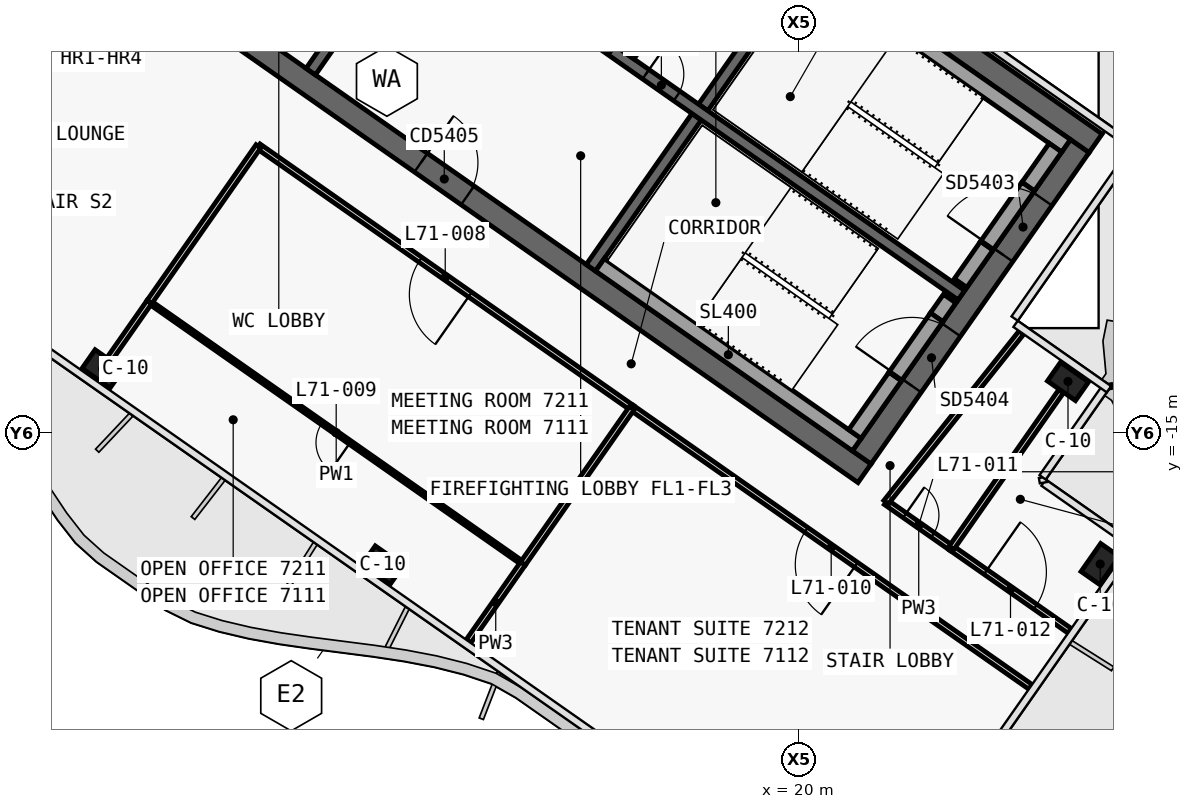
"""IFC4 building model, lengths in metres.
Left out: names, types, materials, properties, quantities, classifications, styles, units other than length and angle.
Written with IfcOpenShell. Run it as: python <this file> out.ifc"""

import sys

from ifc_helpers import new_model, si_unit, direction, frame, frame_2d, origin, origin_2d, place, context, subcontext, project, spatial, polyline, rectangle, outline, extrude, element, fill, save


model = new_model("IFC4")
c1 = context("Model", 3, precision=1e-05, world=origin(), true_north=direction((0.0, 1.0)))
c2 = subcontext(c1, "Body", "Model", "MODEL_VIEW")
j1 = project(units=[si_unit("LENGTHUNIT", "METRE"), si_unit("PLANEANGLEUNIT", "RADIAN")], contexts=[c1])
p1 = place(None, origin())
s1 = spatial("IfcSite", under=j1, at=p1, CompositionType="ELEMENT")
p2 = place(p1, origin())
s2 = spatial("IfcBuilding", under=s1, at=p2, CompositionType="ELEMENT")
p3 = place(p2, frame((0.0, 0.0, 299.5)))
s3 = spatial("IfcBuildingStorey", under=s2, at=p3, CompositionType="ELEMENT", Elevation=299.5)
p4 = place(p3, frame((0.028, 12.066, 0.0), z_axis=(0.0, 0.0, 1.0), x_axis=(0.819151382952, -0.573577380837, 0.0)))
e1 = element("IfcWall", 1, at=p4, inside=s3, PredefinedType="SHEAR", context=c2, shape_type="SweptSolid", body=[
    extrude(outline(polyline([(33.898, 0.3), (0.0, 0.3), (0.42, -0.3), (33.898, -0.3), (33.898, 0.3)])), origin(), (0.0, 0.0, 1.0), 3.9),
])
p5 = place(p3, frame((0.028, -0.874, 0.0), z_axis=(0.0, 0.0, 1.0), x_axis=(0.819150035022, -0.573579305871, 0.0)))
e2 = element("IfcWall", 2, at=p5, inside=s3, PredefinedType="SHEAR", context=c2, shape_type="SweptSolid", body=[
    extrude(outline(polyline([(26.476, 0.3), (0.0, 0.3), (0.42, -0.3), (26.476, -0.3), (26.476, 0.3)])), origin(), (0.0, 0.0, 1.0), 3.9),
])
p6 = place(p5, frame((1.026, 0.0, 0.0)))
e3 = element("IfcOpeningElement", 3, at=p6, cuts=e2, PredefinedType="OPENING", context=c2, shape_type="SweptSolid", body=[
    extrude(rectangle(XDim=1.5, YDim=2.1, at=frame_2d((0.75, 1.05))), frame((0.0, 0.31, 0.0), z_axis=(0.0, -1.0, 0.0), x_axis=(1.0, 0.0, 0.0)), (0.0, 0.0, 1.0), 0.62),
])
p7 = place(p5, frame((12.226, 0.0, 0.0)))
e4 = element("IfcOpeningElement", 4, at=p7, cuts=e2, PredefinedType="OPENING", context=c2, shape_type="SweptSolid", body=[
    extrude(rectangle(XDim=1.5, YDim=2.1, at=frame_2d((0.75, 1.05))), frame((0.0, 0.31, 0.0), z_axis=(0.0, -1.0, 0.0), x_axis=(1.0, 0.0, 0.0)), (0.0, 0.0, 1.0), 0.62),
])
p8 = place(p3, frame((21.642, -15.642, 0.0), z_axis=(0.0, 0.0, 1.0), x_axis=(0.573586866468, 0.819144740944, 0.0)))
e5 = element("IfcWall", 5, at=p8, inside=s3, PredefinedType="SHEAR", context=c2, shape_type="SweptSolid", body=[
    extrude(outline(polyline([(10.0, 0.3), (0.0, 0.3), (0.0, -0.3), (10.0, -0.3), (10.0, 0.3)])), origin(), (0.0, 0.0, 1.0), 3.9),
])
p9 = place(p8, frame((6.5, 0.0, 0.0)))
e6 = element("IfcOpeningElement", 6, at=p9, cuts=e5, PredefinedType="OPENING", context=c2, shape_type="SweptSolid", body=[
    extrude(rectangle(XDim=1.8, YDim=2.1, at=frame_2d((0.9, 1.05))), frame((0.0, 0.31, 0.0), z_axis=(0.0, -1.0, 0.0), x_axis=(1.0, 0.0, 0.0)), (0.0, 0.0, 1.0), 0.62),
])
p10 = place(p8, frame((2.3, 0.0, 0.0)))
e7 = element("IfcOpeningElement", 7, at=p10, cuts=e5, PredefinedType="OPENING", context=c2, shape_type="SweptSolid", body=[
    extrude(rectangle(XDim=1.8, YDim=2.1, at=frame_2d((0.9, 1.05))), frame((0.0, 0.31, 0.0), z_axis=(0.0, -1.0, 0.0), x_axis=(1.0, 0.0, 0.0)), (0.0, 0.0, 1.0), 0.62),
])
p11 = place(p3, frame((7.143, -5.49, 0.0), z_axis=(0.0, 0.0, 1.0), x_axis=(0.573617744349, 0.819123118565, 0.0)))
e8 = element("IfcWall", 8, at=p11, inside=s3, PredefinedType="SHEAR", context=c2, shape_type="SweptSolid", body=[
    extrude(outline(polyline([(0.0, 0.15), (0.0, -0.15), (4.85, -0.15), (4.85, 0.15), (0.0, 0.15)])), origin(), (0.0, 0.0, 1.0), 3.9),
])
p12 = place(p3, frame((14.515, -10.652, 0.0), z_axis=(0.0, 0.0, 1.0), x_axis=(0.573560315113, 0.819163332265, 0.0)))
e9 = element("IfcWall", 9, at=p12, inside=s3, PredefinedType="SHEAR", context=c2, shape_type="SweptSolid", body=[
    extrude(outline(polyline([(0.0, 0.15), (0.0, -0.15), (4.85, -0.15), (4.85, 0.15), (0.0, 0.15)])), origin(), (0.0, 0.0, 1.0), 3.9),
])
p13 = place(p3, frame((17.469, -6.433, 0.0), z_axis=(0.0, 0.0, 1.0), x_axis=(0.573594092424, 0.81913968109, 0.0)))
e10 = element("IfcWall", 10, at=p13, inside=s3, PredefinedType="SHEAR", context=c2, shape_type="SweptSolid", body=[
    extrude(outline(polyline([(4.85, -0.15), (4.85, 0.15), (0.0, 0.15), (0.0, -0.15), (4.85, -0.15)])), origin(), (0.0, 0.0, 1.0), 3.9),
])
p14 = place(p3, frame((2.638, 3.768, 0.0), z_axis=(0.0, 0.0, 1.0), x_axis=(0.819155014212, -0.573572194837, 0.0)))
e11 = element("IfcWall", 11, at=p14, inside=s3, PredefinedType="SHEAR", context=c2, shape_type="SweptSolid", body=[
    extrude(outline(polyline([(0.0, 0.15), (0.0, -0.15), (26.4, -0.15), (26.4, 0.15), (0.0, 0.15)])), origin(), (0.0, 0.0, 1.0), 3.9),
])
p15 = place(p14, frame((9.637, 0.0, 0.0)))
e12 = element("IfcOpeningElement", 12, at=p15, cuts=e11, PredefinedType="OPENING", context=c2, shape_type="SweptSolid", body=[
    extrude(rectangle(XDim=1.2, YDim=2.1, at=frame_2d((0.6, 1.05))), frame((0.0, 0.16, 0.0), z_axis=(0.0, -1.0, 0.0), x_axis=(1.0, 0.0, 0.0)), (0.0, 0.0, 1.0), 0.32),
])
p16 = place(p14, frame((11.812, 0.0, 0.0)))
e13 = element("IfcOpeningElement", 13, at=p16, cuts=e11, PredefinedType="OPENING", context=c2, shape_type="SweptSolid", body=[
    extrude(rectangle(XDim=1.2, YDim=2.1, at=frame_2d((0.6, 1.05))), frame((0.0, 0.16, 0.0), z_axis=(0.0, -1.0, 0.0), x_axis=(1.0, 0.0, 0.0)), (0.0, 0.0, 1.0), 0.32),
])
p17 = place(p14, frame((13.988, 0.0, 0.0)))
e14 = element("IfcOpeningElement", 14, at=p17, cuts=e11, PredefinedType="OPENING", context=c2, shape_type="SweptSolid", body=[
    extrude(rectangle(XDim=1.2, YDim=2.1, at=frame_2d((0.6, 1.05))), frame((0.0, 0.16, 0.0), z_axis=(0.0, -1.0, 0.0), x_axis=(1.0, 0.0, 0.0)), (0.0, 0.0, 1.0), 0.32),
])
p18 = place(p14, frame((16.262, 0.0, 0.0)))
e15 = element("IfcOpeningElement", 15, at=p18, cuts=e11, PredefinedType="OPENING", context=c2, shape_type="SweptSolid", body=[
    extrude(rectangle(XDim=1.0, YDim=2.1, at=frame_2d((0.5, 1.05))), frame((0.0, 0.16, 0.0), z_axis=(0.0, -1.0, 0.0), x_axis=(1.0, 0.0, 0.0)), (0.0, 0.0, 1.0), 0.32),
])
for number, where, z_axis, x_axis in (
    (16, (1.665, -13.313, 0.0), (0.0, 0.0, 1.0), (0.819, -0.574, 0.0)),
    (17, (9.038, -18.475, 0.0), (0.0, 0.0, 1.0), (0.819, -0.574, 0.0)),
    (18, (27.07, -13.644, 0.0), (0.0, 0.0, 1.0), (0.819, -0.574, 0.0)),
    (19, (27.917, -18.449, 0.0), (0.0, 0.0, 1.0), (0.574, 0.819, 0.0)),
):
    element("IfcColumn", number, at=place(p3, frame(where, z_axis=z_axis, x_axis=x_axis)), inside=s3, PredefinedType="COLUMN", context=c2, shape_type="SweptSolid", body=[
        extrude(rectangle(XDim=0.9, YDim=0.6, at=origin_2d()), origin(), (0.0, 0.0, 1.0), 3.9),
    ])
p19 = place(p3, frame((15.565, -5.1, 0.0), z_axis=(0.0, 0.0, 1.0), x_axis=(0.573560315113, 0.819163332265, 0.0)))
e20 = element("IfcWall", 20, at=p19, inside=s3, PredefinedType="SOLIDWALL", context=c2, shape_type="SweptSolid", body=[
    extrude(rectangle(XDim=4.85, YDim=0.2, at=frame_2d((2.425, 0.0))), origin(), (0.0, 0.0, 1.0), 3.9),
])
p20 = place(p3, frame((20.259, -2.71, 0.0), z_axis=(0.0, 0.0, 1.0), x_axis=(0.81914849389, -0.573581506813, 0.0)))
e21 = element("IfcWall", 21, at=p20, inside=s3, PredefinedType="SOLIDWALL", context=c2, shape_type="SweptSolid", body=[
    extrude(rectangle(XDim=8.25, YDim=0.4, at=frame_2d((4.125, 0.0))), origin(), (0.0, 0.0, 1.0), 3.62),
])
p21 = place(p3, frame((24.244, -11.055, 0.0), z_axis=(0.0, 0.0, 1.0), x_axis=(0.573571582932, 0.819155442668, 0.0)))
e22 = element("IfcWall", 22, at=p21, inside=s3, PredefinedType="SOLIDWALL", context=c2, shape_type="SweptSolid", body=[
    extrude(rectangle(XDim=1.2, YDim=0.4, at=frame_2d((0.6, 0.0))), origin(), (0.0, 0.0, 1.0), 3.62),
])
p22 = place(p3, frame((26.022, -8.515, 0.0), z_axis=(0.0, 0.0, 1.0), x_axis=(0.573619628835, 0.819121798889, 0.0)))
e23 = element("IfcWall", 23, at=p22, inside=s3, PredefinedType="SOLIDWALL", context=c2, shape_type="SweptSolid", body=[
    extrude(rectangle(XDim=1.25, YDim=0.4, at=frame_2d((0.625, 0.0))), origin(), (0.0, 0.0, 1.0), 3.62),
])
p23 = place(p3, frame((24.932, -10.072, 2.15), z_axis=(0.0, 0.0, 1.0), x_axis=(0.573591692345, 0.819141361715, 0.0)))
e24 = element("IfcWall", 24, at=p23, inside=s3, PredefinedType="SOLIDWALL", context=c2, shape_type="SweptSolid", body=[
    extrude(rectangle(XDim=1.9, YDim=0.4, at=frame_2d((0.95, 0.0))), origin(), (0.0, 0.0, 1.0), 1.47),
])
p24 = place(p3, frame((14.753, -10.574, 0.0), z_axis=(0.0, 0.0, 1.0), x_axis=(0.819158229677, -0.573567602601, 0.0)))
e25 = element("IfcWall", 25, at=p24, inside=s3, PredefinedType="SOLIDWALL", context=c2, shape_type="SweptSolid", body=[
    extrude(rectangle(XDim=8.25, YDim=0.4, at=frame_2d((4.125, 0.0))), origin(), (0.0, 0.0, 1.0), 3.62),
])
p25 = place(p3, frame((21.462, -15.028, 0.0), z_axis=(0.0, 0.0, 1.0), x_axis=(0.573559770908, 0.819163713305, 0.0)))
e26 = element("IfcWall", 26, at=p25, inside=s3, PredefinedType="SOLIDWALL", context=c2, shape_type="SweptSolid", body=[
    extrude(rectangle(XDim=1.85, YDim=0.4, at=frame_2d((0.925, 0.0))), origin(), (0.0, 0.0, 1.0), 3.62),
])
p26 = place(p3, frame((23.613, -11.956, 0.0), z_axis=(0.0, 0.0, 1.0), x_axis=(0.573435029941, 0.819251039936, 0.0)))
e27 = element("IfcWall", 27, at=p26, inside=s3, PredefinedType="SOLIDWALL", context=c2, shape_type="SweptSolid", body=[
    extrude(rectangle(XDim=0.6, YDim=0.4, at=frame_2d((0.3, 0.0))), origin(), (0.0, 0.0, 1.0), 3.62),
])
p27 = place(p3, frame((22.523, -13.512, 2.15), z_axis=(0.0, 0.0, 1.0), x_axis=(0.573591692345, 0.819141361715, 0.0)))
e28 = element("IfcWall", 28, at=p27, inside=s3, PredefinedType="SOLIDWALL", context=c2, shape_type="SweptSolid", body=[
    extrude(rectangle(XDim=1.9, YDim=0.4, at=frame_2d((0.95, 0.0))), origin(), (0.0, 0.0, 1.0), 1.47),
])
p28 = place(p3, frame((22.281, -16.822, 0.0), z_axis=(0.0, 0.0, 1.0), x_axis=(0.819166447083, -0.573555866479, 0.0)))
e29 = element("IfcWall", 29, at=p28, inside=s3, PredefinedType="PARTITIONING", context=c2, shape_type="SweptSolid", body=[
    extrude(rectangle(XDim=2.102, YDim=0.15, at=frame_2d((1.051, 0.0))), origin(), (0.0, 0.0, 1.0), 3.05),
])
p29 = place(p28, frame((0.601, 0.0, 0.0)))
e30 = element("IfcOpeningElement", 30, at=p29, cuts=e29, PredefinedType="OPENING", context=c2, shape_type="SweptSolid", body=[
    extrude(rectangle(XDim=0.9, YDim=2.1, at=frame_2d((0.45, 1.05))), frame((0.0, 0.085, 0.0), z_axis=(0.0, -1.0, 0.0), x_axis=(1.0, 0.0, 0.0)), (0.0, 0.0, 1.0), 0.17),
])
p30 = place(p3, frame((23.999, -18.025, 0.0), z_axis=(0.0, 0.0, 1.0), x_axis=(0.819168564183, -0.573552842775, 0.0)))
e31 = element("IfcWall", 31, at=p30, inside=s3, PredefinedType="PARTITIONING", context=c2, shape_type="SweptSolid", body=[
    extrude(rectangle(XDim=3.802, YDim=0.15, at=frame_2d((1.901, 0.0))), origin(), (0.0, 0.0, 1.0), 3.0),
])
p31 = place(p30, frame((1.101, 0.0, 0.0)))
e32 = element("IfcOpeningElement", 32, at=p31, cuts=e31, PredefinedType="OPENING", context=c2, shape_type="SweptSolid", body=[
    extrude(rectangle(XDim=1.6, YDim=2.1, at=frame_2d((0.8, 1.05))), frame((0.0, 0.085, 0.0), z_axis=(0.0, -1.0, 0.0), x_axis=(1.0, 0.0, 0.0)), (0.0, 0.0, 1.0), 0.17),
])
p32 = place(p3, frame((15.598, -14.34, 0.0), z_axis=(0.0, 0.0, 1.0), x_axis=(-0.81915546166, 0.573571555809, 0.0)))
e33 = element("IfcWall", 33, at=p32, inside=s3, PredefinedType="PARTITIONING", context=c2, shape_type="SweptSolid", body=[
    extrude(rectangle(XDim=12.002, YDim=0.15, at=frame_2d((6.001, 0.0))), origin(), (0.0, 0.0, 1.0), 3.05),
])
p33 = place(p32, frame((5.201, 0.0, 0.0)))
e34 = element("IfcOpeningElement", 34, at=p33, cuts=e33, PredefinedType="OPENING", context=c2, shape_type="SweptSolid", body=[
    extrude(rectangle(XDim=1.6, YDim=2.1, at=frame_2d((0.8, 1.05))), frame((0.0, 0.085, 0.0), z_axis=(0.0, -1.0, 0.0), x_axis=(1.0, 0.0, 0.0)), (0.0, 0.0, 1.0), 0.17),
])
p34 = place(p3, frame((26.081, -21.68, 0.0), z_axis=(0.0, 0.0, 1.0), x_axis=(-0.819158447199, 0.573567291939, 0.0)))
e35 = element("IfcWall", 35, at=p34, inside=s3, PredefinedType="PARTITIONING", context=c2, shape_type="SweptSolid", body=[
    extrude(rectangle(XDim=12.802, YDim=0.15, at=frame_2d((6.401, 0.0))), origin(), (0.0, 0.0, 1.0), 3.0),
])
p35 = place(p34, frame((5.601, 0.0, 0.0)))
e36 = element("IfcOpeningElement", 36, at=p35, cuts=e35, PredefinedType="OPENING", context=c2, shape_type="SweptSolid", body=[
    extrude(rectangle(XDim=1.6, YDim=2.1, at=frame_2d((0.8, 1.05))), frame((0.0, 0.085, 0.0), z_axis=(0.0, -1.0, 0.0), x_axis=(1.0, 0.0, 0.0)), (0.0, 0.0, 1.0), 0.17),
])
p36 = place(p3, frame((26.886, -13.906, 0.0), z_axis=(0.0, 0.0, 1.0), x_axis=(-0.573563323307, -0.819161225985, 0.0)))
e37 = element("IfcWall", 37, at=p36, inside=s3, PredefinedType="PARTITIONING", context=c2, shape_type="SweptSolid", body=[
    extrude(rectangle(XDim=5.03, YDim=0.15, at=frame_2d((2.515, 0.0))), origin(), (0.0, 0.0, 1.0), 3.05),
])
p37 = place(p3, frame((22.282, -16.823, 0.0), z_axis=(0.0, 0.0, 1.0), x_axis=(0.623563137477, 0.781772993637, 0.0)))
e38 = element("IfcWall", 38, at=p37, inside=s3, PredefinedType="PARTITIONING", context=c2, shape_type="SweptSolid", body=[
    extrude(rectangle(XDim=5.711, YDim=0.15, at=frame_2d((2.855, 0.0))), origin(), (0.0, 0.0, 1.0), 3.05),
])
p38 = place(p3, frame((12.728, -18.435, 0.0), z_axis=(0.0, 0.0, 1.0), x_axis=(-0.819156404271, 0.573570209602, 0.0)))
e39 = element("IfcWall", 39, at=p38, inside=s3, PredefinedType="PARTITIONING", context=c2, shape_type="SweptSolid", body=[
    extrude(rectangle(XDim=12.0, YDim=0.1, at=frame_2d((6.0, 0.0))), origin(), (0.0, 0.0, 1.0), 3.05),
])
p39 = place(p38, frame((5.55, 0.0, 0.0)))
e40 = element("IfcOpeningElement", 40, at=p39, cuts=e39, PredefinedType="OPENING", context=c2, shape_type="SweptSolid", body=[
    extrude(rectangle(XDim=0.9, YDim=2.1, at=frame_2d((0.45, 1.05))), frame((0.0, 0.06, 0.0), z_axis=(0.0, -1.0, 0.0), x_axis=(1.0, 0.0, 0.0)), (0.0, 0.0, 1.0), 0.12),
])
p40 = place(p3, frame((12.728, -18.435, 0.0), z_axis=(0.0, 0.0, 1.0), x_axis=(-0.573560689761, -0.819163069945, 0.0)))
e41 = element("IfcWall", 41, at=p40, inside=s3, PredefinedType="PARTITIONING", context=c2, shape_type="SweptSolid", body=[
    extrude(rectangle(XDim=2.499, YDim=0.15, at=frame_2d((1.25, 0.0))), origin(), (0.0, 0.0, 1.0), 3.0),
])
p41 = place(p3, frame((1.849, -13.051, 0.0), z_axis=(0.0, 0.0, 1.0), x_axis=(0.573623601139, 0.819119017125, 0.0)))
e42 = element("IfcWall", 42, at=p41, inside=s3, PredefinedType="PARTITIONING", context=c2, shape_type="SweptSolid", body=[
    extrude(rectangle(XDim=1.829, YDim=0.15, at=frame_2d((0.915, 0.0))), origin(), (0.0, 0.0, 1.0), 3.05),
])
p42 = place(p3, frame((15.596, -14.339, 0.0), z_axis=(0.0, 0.0, 1.0), x_axis=(-0.573563925118, -0.819160804606, 0.0)))
e43 = element("IfcWall", 43, at=p42, inside=s3, PredefinedType="PARTITIONING", context=c2, shape_type="SweptSolid", body=[
    extrude(rectangle(XDim=5.0, YDim=0.15, at=frame_2d((2.5, 0.0))), origin(), (0.0, 0.0, 1.0), 3.62),
])
p43 = place(p3, frame((2.898, -11.552, 0.0), z_axis=(0.0, 0.0, 1.0), x_axis=(0.573586866468, 0.819144740944, 0.0)))
e44 = element("IfcWall", 44, at=p43, inside=s3, PredefinedType="PARTITIONING", context=c2, shape_type="SweptSolid", body=[
    extrude(rectangle(XDim=5.0, YDim=0.15, at=frame_2d((2.5, 0.0))), origin(), (0.0, 0.0, 1.0), 3.05),
])
p44 = place(p18, origin())
e45 = element("IfcDoor", 45, at=p44, inside=s3, OperationType="SINGLE_SWING_RIGHT", PredefinedType="DOOR", context=c2, shape_type="SweptSolid", body=[
    extrude(rectangle(XDim=1.0, YDim=2.1, at=frame_2d((0.5, 1.05))), frame((0.0, 0.025, 0.0), z_axis=(0.0, -1.0, 0.0), x_axis=(1.0, 0.0, 0.0)), (0.0, 0.0, 1.0), 0.05),
])
fill(e15, e45)
p45 = place(p7, origin())
e46 = element("IfcDoor", 46, at=p45, inside=s3, OperationType="DOUBLE_DOOR_SINGLE_SWING", PredefinedType="DOOR", context=c2, shape_type="SweptSolid", body=[
    extrude(rectangle(XDim=1.5, YDim=2.1, at=frame_2d((0.75, 1.05))), frame((0.0, 0.025, 0.0), z_axis=(0.0, -1.0, 0.0), x_axis=(1.0, 0.0, 0.0)), (0.0, 0.0, 1.0), 0.05),
])
fill(e4, e46)
p46 = place(p9, origin())
e47 = element("IfcDoor", 47, at=p46, inside=s3, OperationType="DOUBLE_DOOR_SINGLE_SWING", PredefinedType="DOOR", context=c2, shape_type="SweptSolid", body=[
    extrude(rectangle(XDim=1.8, YDim=2.1, at=frame_2d((0.9, 1.05))), frame((0.0, 0.025, 0.0), z_axis=(0.0, -1.0, 0.0), x_axis=(1.0, 0.0, 0.0)), (0.0, 0.0, 1.0), 0.05),
])
fill(e6, e47)
p47 = place(p10, origin())
e48 = element("IfcDoor", 48, at=p47, inside=s3, OperationType="DOUBLE_DOOR_SINGLE_SWING", PredefinedType="DOOR", context=c2, shape_type="SweptSolid", body=[
    extrude(rectangle(XDim=1.8, YDim=2.1, at=frame_2d((0.9, 1.05))), frame((0.0, 0.025, 0.0), z_axis=(0.0, -1.0, 0.0), x_axis=(1.0, 0.0, 0.0)), (0.0, 0.0, 1.0), 0.05),
])
fill(e7, e48)
p48 = place(p33, origin())
e49 = element("IfcDoor", 49, at=p48, inside=s3, OperationType="DOUBLE_DOOR_SINGLE_SWING", PredefinedType="DOOR", context=c2, shape_type="SweptSolid", body=[
    extrude(rectangle(XDim=1.6, YDim=2.1, at=frame_2d((0.8, 1.05))), frame((0.0, 0.025, 0.0), z_axis=(0.0, -1.0, 0.0), x_axis=(1.0, 0.0, 0.0)), (0.0, 0.0, 1.0), 0.05),
])
fill(e34, e49)
p49 = place(p39, origin())
e50 = element("IfcDoor", 50, at=p49, inside=s3, OperationType="SINGLE_SWING_LEFT", PredefinedType="DOOR", context=c2, shape_type="SweptSolid", body=[
    extrude(rectangle(XDim=0.9, YDim=2.1, at=frame_2d((0.45, 1.05))), frame((0.0, 0.025, 0.0), z_axis=(0.0, -1.0, 0.0), x_axis=(1.0, 0.0, 0.0)), (0.0, 0.0, 1.0), 0.05),
])
fill(e40, e50)
p50 = place(p35, origin())
e51 = element("IfcDoor", 51, at=p50, inside=s3, OperationType="DOUBLE_DOOR_SINGLE_SWING", PredefinedType="DOOR", context=c2, shape_type="SweptSolid", body=[
    extrude(rectangle(XDim=1.6, YDim=2.1, at=frame_2d((0.8, 1.05))), frame((0.0, 0.025, 0.0), z_axis=(0.0, -1.0, 0.0), x_axis=(1.0, 0.0, 0.0)), (0.0, 0.0, 1.0), 0.05),
])
fill(e36, e51)
p51 = place(p29, origin())
e52 = element("IfcDoor", 52, at=p51, inside=s3, OperationType="SINGLE_SWING_RIGHT", PredefinedType="DOOR", context=c2, shape_type="SweptSolid", body=[
    extrude(rectangle(XDim=0.9, YDim=2.1, at=frame_2d((0.45, 1.05))), frame((0.0, 0.025, 0.0), z_axis=(0.0, -1.0, 0.0), x_axis=(1.0, 0.0, 0.0)), (0.0, 0.0, 1.0), 0.05),
])
fill(e30, e52)
p52 = place(p31, origin())
e53 = element("IfcDoor", 53, at=p52, inside=s3, OperationType="DOUBLE_DOOR_SINGLE_SWING", PredefinedType="DOOR", context=c2, shape_type="SweptSolid", body=[
    extrude(rectangle(XDim=1.6, YDim=2.1, at=frame_2d((0.8, 1.05))), frame((0.0, 0.025, 0.0), z_axis=(0.0, -1.0, 0.0), x_axis=(1.0, 0.0, 0.0)), (0.0, 0.0, 1.0), 0.05),
])
fill(e32, e53)
save(model, sys.argv[1])
